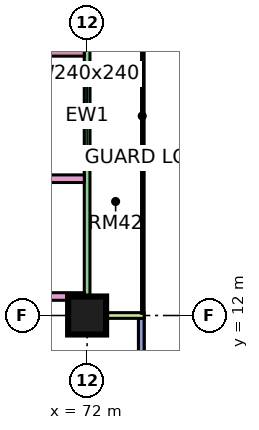
"""IFC4 building model, lengths in metres.
Left out: names, types, materials, properties, quantities, classifications, styles, units other than length and angle.
Written with IfcOpenShell. Run it as: python <this file> out.ifc"""

import sys

from ifc_helpers import new_model, si_unit, direction, frame, frame_2d, origin, origin_2d, place, context, subcontext, project, spatial, rectangle, extrude, element, fill, save


model = new_model("IFC4")
c1 = context("Model", 3, precision=1e-05, world=origin(), true_north=direction((0.0, 1.0)))
c2 = subcontext(c1, "Body", "Model", "MODEL_VIEW")
j1 = project(units=[si_unit("LENGTHUNIT", "METRE"), si_unit("PLANEANGLEUNIT", "RADIAN")], contexts=[c1])
p1 = place(None, origin())
s1 = spatial("IfcSite", under=j1, at=p1, CompositionType="ELEMENT")
p2 = place(p1, origin())
s2 = spatial("IfcBuilding", under=s1, at=p2, CompositionType="ELEMENT")
p3 = place(p2, frame((0.0, 0.0, 118.15)))
s3 = spatial("IfcBuildingStorey", under=s2, at=p3, CompositionType="ELEMENT", Elevation=118.15)
p4 = place(p3, frame((72.0, 12.0, 0.0), z_axis=(0.0, 0.0, 1.0), x_axis=(1.0, 0.0, 0.0)))
e1 = element("IfcColumn", 1, at=p4, inside=s3, PredefinedType="COLUMN", context=c2, shape_type="SweptSolid", body=[
    extrude(rectangle(XDim=1.0, YDim=1.0, at=origin_2d()), origin(), (0.0, 0.0, 1.0), 3.75),
])
p5 = place(p3, frame((73.425, 1.5, 0.0), z_axis=(0.0, 0.0, 1.0), x_axis=(0.0, 1.0, 0.0)))
e2 = element("IfcWall", 2, at=p5, inside=s3, PredefinedType="SOLIDWALL", context=c2, shape_type="SweptSolid", body=[
    extrude(rectangle(XDim=10.425, YDim=0.15, at=frame_2d((5.212, 0.0))), origin(), (0.0, 0.0, 1.0), 3.35),
])
p6 = place(p5, frame((1.3, 0.0, 0.45)))
e3 = element("IfcOpeningElement", 3, at=p6, cuts=e2, PredefinedType="OPENING", context=c2, shape_type="SweptSolid", body=[
    extrude(rectangle(XDim=3.0, YDim=2.4, at=frame_2d((1.5, 1.2))), frame((0.0, 0.085, 0.0), z_axis=(0.0, -1.0, 0.0), x_axis=(1.0, 0.0, 0.0)), (0.0, 0.0, 1.0), 0.17),
])
p7 = place(p5, frame((8.012, 0.0, 1.7)))
e4 = element("IfcOpeningElement", 4, at=p7, cuts=e2, PredefinedType="OPENING", context=c2, shape_type="SweptSolid", body=[
    extrude(rectangle(XDim=1.2, YDim=0.9, at=frame_2d((0.6, 0.45))), frame((0.0, 0.085, 0.0), z_axis=(0.0, -1.0, 0.0), x_axis=(1.0, 0.0, 0.0)), (0.0, 0.0, 1.0), 0.17),
])
p8 = place(p3, frame((72.0, 12.075, 0.0), z_axis=(0.0, 0.0, 1.0), x_axis=(0.0, 1.0, 0.0)))
e5 = element("IfcWall", 5, at=p8, inside=s3, PredefinedType="SOLIDWALL", context=c2, shape_type="SweptSolid", body=[
    extrude(rectangle(XDim=10.35, YDim=0.15, at=frame_2d((5.175, 0.0))), origin(), (0.0, 0.0, 1.0), 3.35),
])
p9 = place(p8, frame((3.975, 0.0, 0.45)))
e6 = element("IfcOpeningElement", 6, at=p9, cuts=e5, PredefinedType="OPENING", context=c2, shape_type="SweptSolid", body=[
    extrude(rectangle(XDim=2.4, YDim=2.4, at=frame_2d((1.2, 1.2))), frame((0.0, 0.085, 0.0), z_axis=(0.0, -1.0, 0.0), x_axis=(1.0, 0.0, 0.0)), (0.0, 0.0, 1.0), 0.17),
])
p10 = place(p8, frame((7.688, 0.0, 0.0)))
e7 = element("IfcOpeningElement", 7, at=p10, cuts=e5, PredefinedType="OPENING", context=c2, shape_type="SweptSolid", body=[
    extrude(rectangle(XDim=1.8, YDim=2.4, at=frame_2d((0.9, 1.2))), frame((0.0, 0.085, 0.0), z_axis=(0.0, -1.0, 0.0), x_axis=(1.0, 0.0, 0.0)), (0.0, 0.0, 1.0), 0.17),
])
p11 = place(p3, frame((73.5, 12.0, 0.0), z_axis=(0.0, 0.0, 1.0), x_axis=(-1.0, 0.0, 0.0)))
e8 = element("IfcWall", 8, at=p11, inside=s3, PredefinedType="SOLIDWALL", context=c2, shape_type="SweptSolid", body=[
    extrude(rectangle(XDim=1.5, YDim=0.15, at=frame_2d((0.75, 0.0))), origin(), (0.0, 0.0, 1.0), 3.35),
])
p12 = place(p3, frame((40.65, 12.5, 0.0), z_axis=(0.0, 0.0, 1.0), x_axis=(1.0, 0.0, 0.0)))
e9 = element("IfcWall", 9, at=p12, inside=s3, PredefinedType="PARTITIONING", context=c2, shape_type="SweptSolid", body=[
    extrude(rectangle(XDim=31.276, YDim=0.2, at=frame_2d((15.638, 0.0))), origin(), (0.0, 0.0, 1.0), 3.35),
])
p13 = place(p12, frame((20.7, 0.0, 0.0)))
e10 = element("IfcOpeningElement", 10, at=p13, cuts=e9, PredefinedType="OPENING", context=c2, shape_type="SweptSolid", body=[
    extrude(rectangle(XDim=1.0, YDim=2.1, at=frame_2d((0.5, 1.05))), frame((0.0, 0.11, 0.0), z_axis=(0.0, -1.0, 0.0), x_axis=(1.0, 0.0, 0.0)), (0.0, 0.0, 1.0), 0.22),
])
p14 = place(p12, frame((1.05, 0.0, 0.0)))
e11 = element("IfcOpeningElement", 11, at=p14, cuts=e9, PredefinedType="OPENING", context=c2, shape_type="SweptSolid", body=[
    extrude(rectangle(XDim=1.0, YDim=2.1, at=frame_2d((0.5, 1.05))), frame((0.0, 0.11, 0.0), z_axis=(0.0, -1.0, 0.0), x_axis=(1.0, 0.0, 0.0)), (0.0, 0.0, 1.0), 0.22),
])
p15 = place(p3, frame((51.225, 15.6, 0.0), z_axis=(0.0, 0.0, 1.0), x_axis=(1.0, 0.0, 0.0)))
e12 = element("IfcWall", 12, at=p15, inside=s3, PredefinedType="PARTITIONING", context=c2, shape_type="SweptSolid", body=[
    extrude(rectangle(XDim=20.701, YDim=0.2, at=frame_2d((10.351, 0.0))), origin(), (0.0, 0.0, 1.0), 3.35),
])
p16 = place(p15, frame((9.725, 0.0, 0.0)))
e13 = element("IfcOpeningElement", 13, at=p16, cuts=e12, PredefinedType="OPENING", context=c2, shape_type="SweptSolid", body=[
    extrude(rectangle(XDim=1.0, YDim=2.1, at=frame_2d((0.5, 1.05))), frame((0.0, 0.11, 0.0), z_axis=(0.0, -1.0, 0.0), x_axis=(1.0, 0.0, 0.0)), (0.0, 0.0, 1.0), 0.22),
])
p17 = place(p15, frame((0.875, 0.0, 0.0)))
e14 = element("IfcOpeningElement", 14, at=p17, cuts=e12, PredefinedType="OPENING", context=c2, shape_type="SweptSolid", body=[
    extrude(rectangle(XDim=1.0, YDim=2.1, at=frame_2d((0.5, 1.05))), frame((0.0, 0.11, 0.0), z_axis=(0.0, -1.0, 0.0), x_axis=(1.0, 0.0, 0.0)), (0.0, 0.0, 1.0), 0.22),
])
p18 = place(p3, frame((62.625, 18.9, 0.0), z_axis=(0.0, 0.0, 1.0), x_axis=(1.0, 0.0, 0.0)))
e15 = element("IfcWall", 15, at=p18, inside=s3, PredefinedType="PARTITIONING", context=c2, shape_type="SweptSolid", body=[
    extrude(rectangle(XDim=9.301, YDim=0.15, at=frame_2d((4.65, 0.0))), origin(), (0.0, 0.0, 1.0), 3.35),
])
p19 = place(p18, frame((5.775, 0.0, 0.0)))
e16 = element("IfcOpeningElement", 16, at=p19, cuts=e15, PredefinedType="OPENING", context=c2, shape_type="SweptSolid", body=[
    extrude(rectangle(XDim=0.9, YDim=2.1, at=frame_2d((0.45, 1.05))), frame((0.0, 0.085, 0.0), z_axis=(0.0, -1.0, 0.0), x_axis=(1.0, 0.0, 0.0)), (0.0, 0.0, 1.0), 0.17),
])
p20 = place(p9, origin())
e17 = element("IfcWindow", 17, at=p20, inside=s3, PartitioningType="SINGLE_PANEL", PredefinedType="WINDOW", context=c2, shape_type="SweptSolid", body=[
    extrude(rectangle(XDim=2.4, YDim=2.4, at=frame_2d((1.2, 1.2))), frame((0.0, 0.03, 0.0), z_axis=(0.0, -1.0, 0.0), x_axis=(1.0, 0.0, 0.0)), (0.0, 0.0, 1.0), 0.06),
])
fill(e6, e17)
save(model, sys.argv[1])
